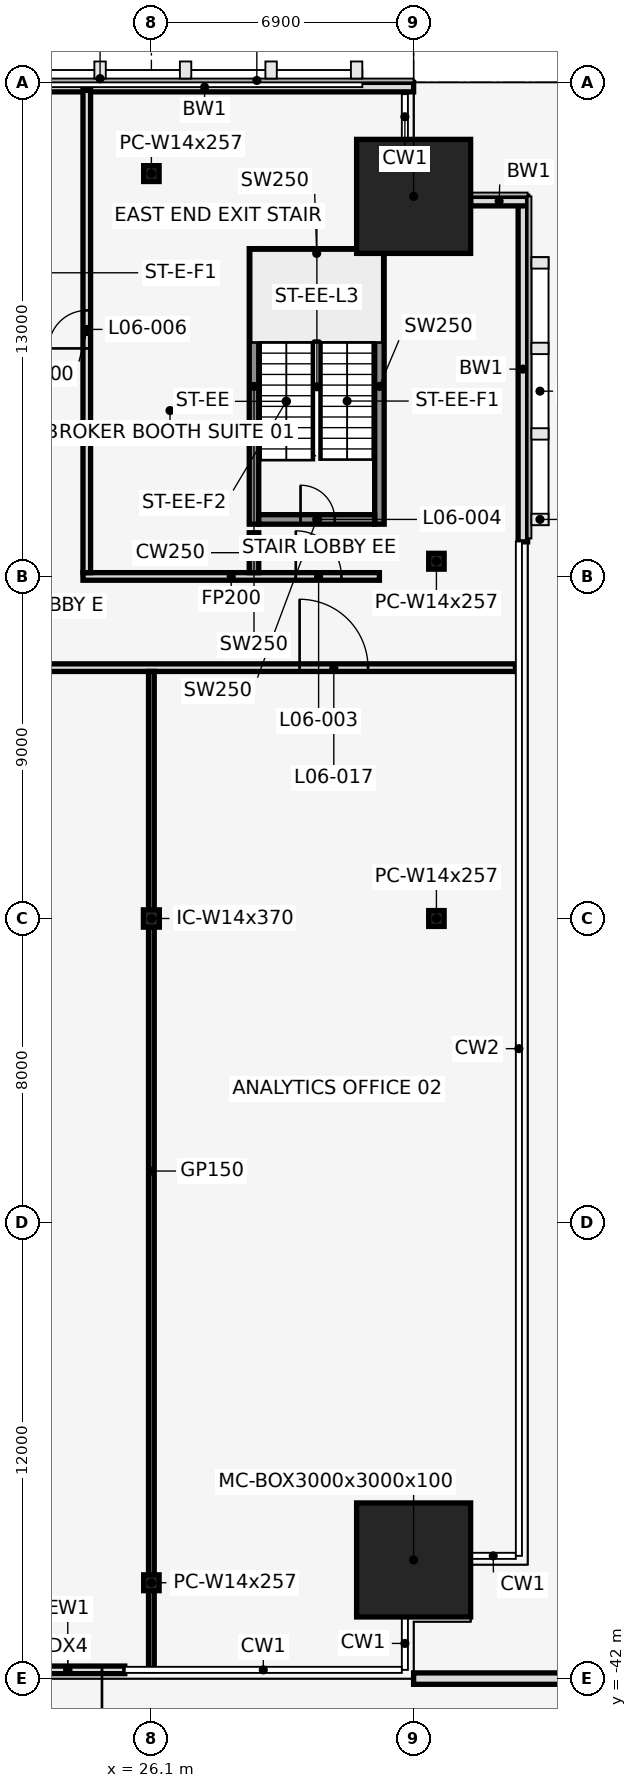
"""IFC4 building model, lengths in metres.
Left out: names, types, materials, properties, quantities, classifications, styles, units other than length and angle.
Written with IfcOpenShell. Run it as: python <this file> out.ifc"""

import sys

from ifc_helpers import new_model, si_unit, direction, frame, frame_2d, origin, origin_2d, place, context, subcontext, project, spatial, rectangle, hollow_rectangle, i_section, extrude, element, fill, save


model = new_model("IFC4")
c1 = context("Model", 3, precision=1e-05, world=origin(), true_north=direction((0.0, 1.0)))
c2 = subcontext(c1, "Body", "Model", "MODEL_VIEW")
j1 = project(units=[si_unit("LENGTHUNIT", "METRE"), si_unit("PLANEANGLEUNIT", "RADIAN")], contexts=[c1])
p1 = place(None, origin())
s1 = spatial("IfcSite", under=j1, at=p1, CompositionType="ELEMENT")
p2 = place(p1, origin())
s2 = spatial("IfcBuilding", under=s1, at=p2, CompositionType="ELEMENT")
p3 = place(p2, frame((0.0, 0.0, 35.0)))
s3 = spatial("IfcBuildingStorey", under=s2, at=p3, CompositionType="ELEMENT", Elevation=35.0)
for number, where, z_axis, x_axis in (
    (1, (26.1, -39.478, 0.0), (0.0, 0.0, 1.0), (1.0, 0.0, 0.0)),
    (2, (26.1, -2.4, 0.0), (0.0, 0.0, 1.0), (1.0, 0.0, 0.0)),
):
    element("IfcColumn", number, at=place(p3, frame(where, z_axis=z_axis, x_axis=x_axis)), inside=s3, PredefinedType="COLUMN", context=c2, shape_type="SweptSolid", body=[
        extrude(i_section(OverallWidth=0.406, OverallDepth=0.417, WebThickness=0.03, FlangeThickness=0.048, at=origin_2d()), origin(), (0.0, 0.0, 1.0), 4.5),
    ])
for number, where, z_axis, x_axis in (
    (3, (33.0, -38.878, 0.0), (0.0, 0.0, 1.0), (1.0, 0.0, 0.0)),
    (4, (33.0, -3.0, 0.0), (0.0, 0.0, 1.0), (1.0, 0.0, 0.0)),
):
    element("IfcColumn", number, at=place(p3, frame(where, z_axis=z_axis, x_axis=x_axis)), inside=s3, PredefinedType="COLUMN", context=c2, shape_type="SweptSolid", body=[
        extrude(hollow_rectangle(XDim=3.0, YDim=3.0, WallThickness=0.1, at=origin_2d()), origin(), (0.0, 0.0, 1.0), 4.5),
    ])
for number, where, z_axis, x_axis in (
    (5, (33.6, -12.6, 0.0), (0.0, 0.0, 1.0), (1.0, 0.0, 0.0)),
    (6, (33.6, -22.0, 0.0), (0.0, 0.0, 1.0), (1.0, 0.0, 0.0)),
):
    element("IfcColumn", number, at=place(p3, frame(where, z_axis=z_axis, x_axis=x_axis)), inside=s3, PredefinedType="COLUMN", context=c2, shape_type="SweptSolid", body=[
        extrude(i_section(OverallWidth=0.406, OverallDepth=0.417, WebThickness=0.03, FlangeThickness=0.048, at=origin_2d()), origin(), (0.0, 0.0, 1.0), 4.5),
    ])
p4 = place(p3, frame((26.1, -22.0, 0.0), z_axis=(0.0, 0.0, 1.0), x_axis=(1.0, 0.0, 0.0)))
e7 = element("IfcColumn", 7, at=p4, inside=s3, PredefinedType="COLUMN", context=c2, shape_type="SweptSolid", body=[
    extrude(i_section(OverallWidth=0.419, OverallDepth=0.455, WebThickness=0.042, FlangeThickness=0.068, at=origin_2d()), origin(), (0.0, 0.0, 1.0), 4.5),
])
p5 = place(p3, frame((33.0, -0.125, 0.0), z_axis=(0.0, 0.0, 1.0), x_axis=(-1.0, 0.0, 0.0)))
e8 = element("IfcWall", 8, at=p5, inside=s3, PredefinedType="STANDARD", context=c2, shape_type="SweptSolid", body=[
    extrude(rectangle(XDim=11.0, YDim=0.25, at=frame_2d((5.5, 0.0))), origin(), (0.0, 0.0, 1.0), 4.35),
])
p6 = place(p3, frame((35.875, -12.09, 0.0), z_axis=(0.0, 0.0, 1.0), x_axis=(0.0, 1.0, 0.0)))
e9 = element("IfcWall", 9, at=p6, inside=s3, PredefinedType="STANDARD", context=c2, shape_type="SweptSolid", body=[
    extrude(rectangle(XDim=9.09, YDim=0.25, at=frame_2d((4.545, 0.0))), origin(), (0.0, 0.0, 1.0), 4.35),
])
p7 = place(p3, frame((36.0, -3.125, 0.0), z_axis=(0.0, 0.0, 1.0), x_axis=(-1.0, 0.0, 0.0)))
e10 = element("IfcWall", 10, at=p7, inside=s3, PredefinedType="STANDARD", context=c2, shape_type="SweptSolid", body=[
    extrude(rectangle(XDim=1.5, YDim=0.25, at=frame_2d((0.75, 0.0))), origin(), (0.0, 0.0, 1.0), 4.35),
])
p8 = place(p3, frame((25.4, -41.77, 0.0), z_axis=(0.0, 0.0, 1.0), x_axis=(-1.0, 0.0, 0.0)))
e11 = element("IfcWall", 11, at=p8, inside=s3, PredefinedType="STANDARD", context=c2, shape_type="SweptSolid", body=[
    extrude(rectangle(XDim=3.0, YDim=0.2, at=frame_2d((1.5, 0.0))), origin(), (0.0, 0.0, 1.0), 4.35),
])
p9 = place(p8, frame((0.6, 0.0, 0.0)))
e12 = element("IfcOpeningElement", 12, at=p9, cuts=e11, PredefinedType="OPENING", context=c2, shape_type="SweptSolid", body=[
    extrude(rectangle(XDim=1.8, YDim=2.4, at=frame_2d((0.9, 1.2))), frame((0.0, 0.112, 0.0), z_axis=(0.0, -1.0, 0.0), x_axis=(1.0, 0.0, 0.0)), (0.0, 0.0, 1.0), 0.224),
])
p10 = place(p3, frame((33.0, -42.0, 0.0), z_axis=(0.0, 0.0, 1.0), x_axis=(1.0, 0.0, 0.0)))
e13 = element("IfcWall", 13, at=p10, inside=s3, PredefinedType="PARAPET", context=c2, shape_type="SweptSolid", body=[
    extrude(rectangle(XDim=10.2, YDim=0.3, at=frame_2d((5.1, 0.0))), origin(), (0.0, 0.0, 1.0), 1.1),
])
for number, where, z_axis, x_axis in (
    (14, (28.8, -11.625, 0.0), (0.0, 0.0, 1.0), (0.0, 1.0, 0.0)),
    (15, (32.1, -11.625, 0.0), (0.0, 0.0, 1.0), (0.0, 1.0, 0.0)),
):
    element("IfcWall", number, at=place(p3, frame(where, z_axis=z_axis, x_axis=x_axis)), inside=s3, PredefinedType="SHEAR", context=c2, shape_type="SweptSolid", body=[
        extrude(rectangle(XDim=7.25, YDim=0.25, at=frame_2d((3.625, 0.0))), origin(), (0.0, 0.0, 1.0), 4.5),
    ])
p11 = place(p3, frame((28.925, -11.5, 0.0), z_axis=(0.0, 0.0, 1.0), x_axis=(1.0, 0.0, 0.0)))
e16 = element("IfcWall", 16, at=p11, inside=s3, PredefinedType="SHEAR", context=c2, shape_type="SweptSolid", body=[
    extrude(rectangle(XDim=3.05, YDim=0.25, at=frame_2d((1.525, 0.0))), origin(), (0.0, 0.0, 1.0), 4.5),
])
p12 = place(p11, frame((1.1, 0.0, 0.0)))
e17 = element("IfcOpeningElement", 17, at=p12, cuts=e16, PredefinedType="OPENING", context=c2, shape_type="SweptSolid", body=[
    extrude(rectangle(XDim=0.9, YDim=2.1, at=frame_2d((0.45, 1.05))), frame((0.0, 0.137, 0.0), z_axis=(0.0, -1.0, 0.0), x_axis=(1.0, 0.0, 0.0)), (0.0, 0.0, 1.0), 0.274),
])
p13 = place(p3, frame((28.925, -4.5, 0.0), z_axis=(0.0, 0.0, 1.0), x_axis=(1.0, 0.0, 0.0)))
e18 = element("IfcWall", 18, at=p13, inside=s3, PredefinedType="SHEAR", context=c2, shape_type="SweptSolid", body=[
    extrude(rectangle(XDim=3.05, YDim=0.25, at=frame_2d((1.525, 0.0))), origin(), (0.0, 0.0, 1.0), 4.5),
])
p14 = place(p3, frame((-35.68, -15.4, 0.0), z_axis=(0.0, 0.0, 1.0), x_axis=(1.0, 0.0, 0.0)))
e19 = element("IfcWall", 19, at=p14, inside=s3, PredefinedType="PARTITIONING", context=c2, shape_type="SweptSolid", body=[
    extrude(rectangle(XDim=71.36, YDim=0.2, at=frame_2d((35.68, 0.0))), origin(), (0.0, 0.0, 1.0), 3.36),
])
p15 = place(p14, frame((3.3, 0.0, 0.0)))
e20 = element("IfcOpeningElement", 20, at=p15, cuts=e19, PredefinedType="OPENING", context=c2, shape_type="SweptSolid", body=[
    extrude(rectangle(XDim=1.8, YDim=2.1, at=frame_2d((0.9, 1.05))), frame((0.0, 0.112, 0.0), z_axis=(0.0, -1.0, 0.0), x_axis=(1.0, 0.0, 0.0)), (0.0, 0.0, 1.0), 0.224),
])
p16 = place(p14, frame((7.58, 0.0, 0.0)))
e21 = element("IfcOpeningElement", 21, at=p16, cuts=e19, PredefinedType="OPENING", context=c2, shape_type="SweptSolid", body=[
    extrude(rectangle(XDim=1.0, YDim=2.1, at=frame_2d((0.5, 1.05))), frame((0.0, 0.112, 0.0), z_axis=(0.0, -1.0, 0.0), x_axis=(1.0, 0.0, 0.0)), (0.0, 0.0, 1.0), 0.224),
])
p17 = place(p14, frame((13.48, 0.0, 0.0)))
e22 = element("IfcOpeningElement", 22, at=p17, cuts=e19, PredefinedType="OPENING", context=c2, shape_type="SweptSolid", body=[
    extrude(rectangle(XDim=0.9, YDim=2.1, at=frame_2d((0.45, 1.05))), frame((0.0, 0.112, 0.0), z_axis=(0.0, -1.0, 0.0), x_axis=(1.0, 0.0, 0.0)), (0.0, 0.0, 1.0), 0.224),
])
p18 = place(p14, frame((21.68, 0.0, 0.0)))
e23 = element("IfcOpeningElement", 23, at=p18, cuts=e19, PredefinedType="OPENING", context=c2, shape_type="SweptSolid", body=[
    extrude(rectangle(XDim=1.8, YDim=2.1, at=frame_2d((0.9, 1.05))), frame((0.0, 0.112, 0.0), z_axis=(0.0, -1.0, 0.0), x_axis=(1.0, 0.0, 0.0)), (0.0, 0.0, 1.0), 0.224),
])
p19 = place(p14, frame((30.38, 0.0, 0.0)))
e24 = element("IfcOpeningElement", 24, at=p19, cuts=e19, PredefinedType="OPENING", context=c2, shape_type="SweptSolid", body=[
    extrude(rectangle(XDim=1.8, YDim=2.1, at=frame_2d((0.9, 1.05))), frame((0.0, 0.112, 0.0), z_axis=(0.0, -1.0, 0.0), x_axis=(1.0, 0.0, 0.0)), (0.0, 0.0, 1.0), 0.224),
])
p20 = place(p14, frame((40.58, 0.0, 0.0)))
e25 = element("IfcOpeningElement", 25, at=p20, cuts=e19, PredefinedType="OPENING", context=c2, shape_type="SweptSolid", body=[
    extrude(rectangle(XDim=1.8, YDim=2.1, at=frame_2d((0.9, 1.05))), frame((0.0, 0.112, 0.0), z_axis=(0.0, -1.0, 0.0), x_axis=(1.0, 0.0, 0.0)), (0.0, 0.0, 1.0), 0.224),
])
p21 = place(p14, frame((53.68, 0.0, 0.0)))
e26 = element("IfcOpeningElement", 26, at=p21, cuts=e19, PredefinedType="OPENING", context=c2, shape_type="SweptSolid", body=[
    extrude(rectangle(XDim=1.8, YDim=2.1, at=frame_2d((0.9, 1.05))), frame((0.0, 0.112, 0.0), z_axis=(0.0, -1.0, 0.0), x_axis=(1.0, 0.0, 0.0)), (0.0, 0.0, 1.0), 0.224),
])
p22 = place(p14, frame((65.68, 0.0, 0.0)))
e27 = element("IfcOpeningElement", 27, at=p22, cuts=e19, PredefinedType="OPENING", context=c2, shape_type="SweptSolid", body=[
    extrude(rectangle(XDim=1.8, YDim=2.1, at=frame_2d((0.9, 1.05))), frame((0.0, 0.112, 0.0), z_axis=(0.0, -1.0, 0.0), x_axis=(1.0, 0.0, 0.0)), (0.0, 0.0, 1.0), 0.224),
])
p23 = place(p3, frame((24.3, -13.0, 0.0), z_axis=(0.0, 0.0, 1.0), x_axis=(1.0, 0.0, 0.0)))
e28 = element("IfcWall", 28, at=p23, inside=s3, PredefinedType="PARTITIONING", context=c2, shape_type="SweptSolid", body=[
    extrude(rectangle(XDim=7.8, YDim=0.2, at=frame_2d((3.9, 0.0))), origin(), (0.0, 0.0, 1.0), 3.36),
])
p24 = place(p23, frame((5.6, 0.0, 0.0)))
e29 = element("IfcOpeningElement", 29, at=p24, cuts=e28, PredefinedType="OPENING", context=c2, shape_type="SweptSolid", body=[
    extrude(rectangle(XDim=1.2, YDim=2.1, at=frame_2d((0.6, 1.05))), frame((0.0, 0.112, 0.0), z_axis=(0.0, -1.0, 0.0), x_axis=(1.0, 0.0, 0.0)), (0.0, 0.0, 1.0), 0.224),
])
p25 = place(p3, frame((24.4, -12.9, 0.0), z_axis=(0.0, 0.0, 1.0), x_axis=(0.0, 1.0, 0.0)))
e30 = element("IfcWall", 30, at=p25, inside=s3, PredefinedType="PARTITIONING", context=c2, shape_type="SweptSolid", body=[
    extrude(rectangle(XDim=12.69, YDim=0.2, at=frame_2d((6.345, 0.0))), origin(), (0.0, 0.0, 1.0), 3.36),
])
p26 = place(p25, frame((5.9, 0.0, 0.0)))
e31 = element("IfcOpeningElement", 31, at=p26, cuts=e30, PredefinedType="OPENING", context=c2, shape_type="SweptSolid", body=[
    extrude(rectangle(XDim=1.0, YDim=2.1, at=frame_2d((0.5, 1.05))), frame((0.0, 0.112, 0.0), z_axis=(0.0, -1.0, 0.0), x_axis=(1.0, 0.0, 0.0)), (0.0, 0.0, 1.0), 0.224),
])
p27 = place(p3, frame((26.1, -41.79, 0.0), z_axis=(0.0, 0.0, 1.0), x_axis=(0.0, 1.0, 0.0)))
e32 = element("IfcWall", 32, at=p27, inside=s3, PredefinedType="PARTITIONING", context=c2, shape_type="SweptSolid", body=[
    extrude(rectangle(XDim=26.29, YDim=0.15, at=frame_2d((13.145, 0.0))), origin(), (0.0, 0.0, 1.0), 3.36),
])
p28 = place(p3, frame((28.8, -12.9, 0.0), z_axis=(0.0, 0.0, 1.0), x_axis=(0.0, 1.0, 0.0)))
e33 = element("IfcWall", 33, at=p28, inside=s3, PredefinedType="SHEAR", context=c2, shape_type="SweptSolid", body=[
    extrude(rectangle(XDim=1.05, YDim=0.25, at=frame_2d((0.525, 0.0))), origin(), (0.0, 0.0, 1.0), 4.5),
])
p29 = place(p9, origin())
e34 = element("IfcDoor", 34, at=p29, inside=s3, OperationType="SINGLE_SWING_LEFT", PredefinedType="DOOR", context=c2, shape_type="SweptSolid", body=[
    extrude(rectangle(XDim=1.8, YDim=2.4, at=frame_2d((0.9, 1.2))), frame((0.0, 0.025, 0.0), z_axis=(0.0, -1.0, 0.0), x_axis=(1.0, 0.0, 0.0)), (0.0, 0.0, 1.0), 0.05),
])
fill(e12, e34)
p30 = place(p24, origin())
e35 = element("IfcDoor", 35, at=p30, inside=s3, OperationType="SINGLE_SWING_RIGHT", PredefinedType="DOOR", context=c2, shape_type="SweptSolid", body=[
    extrude(rectangle(XDim=1.2, YDim=2.1, at=frame_2d((0.6, 1.05))), frame((0.0, 0.025, 0.0), z_axis=(0.0, -1.0, 0.0), x_axis=(1.0, 0.0, 0.0)), (0.0, 0.0, 1.0), 0.05),
])
fill(e29, e35)
p31 = place(p12, origin())
e36 = element("IfcDoor", 36, at=p31, inside=s3, OperationType="SINGLE_SWING_LEFT", PredefinedType="DOOR", context=c2, shape_type="SweptSolid", body=[
    extrude(rectangle(XDim=0.9, YDim=2.1, at=frame_2d((0.45, 1.05))), frame((0.0, 0.025, 0.0), z_axis=(0.0, -1.0, 0.0), x_axis=(1.0, 0.0, 0.0)), (0.0, 0.0, 1.0), 0.05),
])
fill(e17, e36)
p32 = place(p26, frame((1.0, 0.0, 0.0), z_axis=(0.0, 0.0, 1.0), x_axis=(-1.0, 0.0, 0.0)))
e37 = element("IfcDoor", 37, at=p32, inside=s3, OperationType="SINGLE_SWING_RIGHT", PredefinedType="DOOR", context=c2, shape_type="SweptSolid", body=[
    extrude(rectangle(XDim=1.0, YDim=2.1, at=frame_2d((0.5, 1.05))), frame((0.0, 0.025, 0.0), z_axis=(0.0, -1.0, 0.0), x_axis=(1.0, 0.0, 0.0)), (0.0, 0.0, 1.0), 0.05),
])
fill(e31, e37)
p33 = place(p22, origin())
e38 = element("IfcDoor", 38, at=p33, inside=s3, OperationType="SINGLE_SWING_LEFT", PredefinedType="DOOR", context=c2, shape_type="SweptSolid", body=[
    extrude(rectangle(XDim=1.8, YDim=2.1, at=frame_2d((0.9, 1.05))), frame((0.0, 0.025, 0.0), z_axis=(0.0, -1.0, 0.0), x_axis=(1.0, 0.0, 0.0)), (0.0, 0.0, 1.0), 0.05),
])
fill(e27, e38)
save(model, sys.argv[1])
